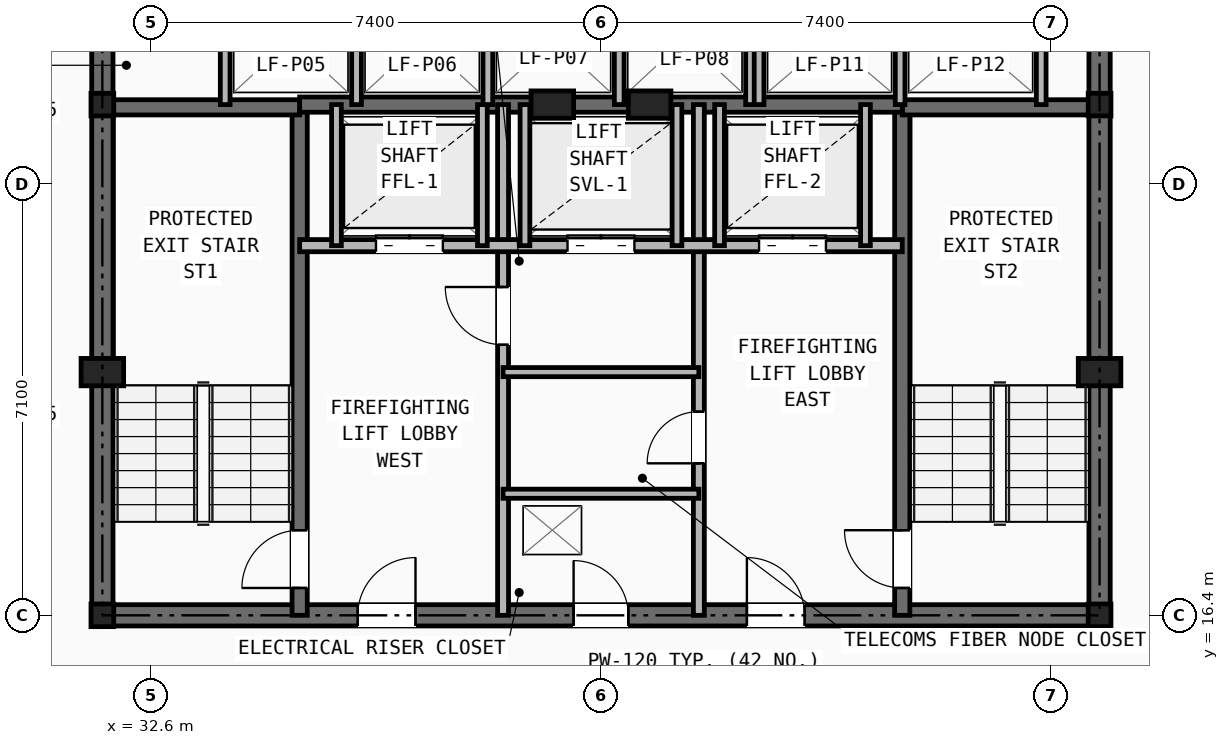
"""IFC4 building model, lengths in metres.
Left out: names, types, materials, properties, quantities, classifications, styles, units other than length and angle.
Written with IfcOpenShell. Run it as: python <this file> out.ifc"""

import sys

from ifc_helpers import new_model, si_unit, direction, frame, frame_2d, origin, origin_2d, place, context, subcontext, project, spatial, rectangle, i_section, extrude, element, fill, save


model = new_model("IFC4")
c1 = context("Model", 3, precision=1e-05, world=origin(), true_north=direction((0.0, 1.0)))
c2 = subcontext(c1, "Body", "Model", "MODEL_VIEW")
j1 = project(units=[si_unit("LENGTHUNIT", "METRE"), si_unit("PLANEANGLEUNIT", "RADIAN")], contexts=[c1])
p1 = place(None, origin())
s1 = spatial("IfcSite", under=j1, at=p1, CompositionType="ELEMENT")
p2 = place(p1, origin())
s2 = spatial("IfcBuilding", under=s1, at=p2, CompositionType="ELEMENT")
p3 = place(p2, frame((0.0, 0.0, 46.4)))
s3 = spatial("IfcBuildingStorey", under=s2, at=p3, CompositionType="ELEMENT", Elevation=46.4)
for number, where, z_axis, x_axis in (
    (1, (31.8, 16.4, 0.0), (0.0, 0.0, 1.0), (1.0, 0.0, 0.0)),
    (2, (48.2, 16.4, 0.0), (0.0, 0.0, 1.0), (1.0, 0.0, 0.0)),
    (3, (31.8, 24.8, 0.0), (0.0, 0.0, 1.0), (1.0, 0.0, 0.0)),
    (4, (48.2, 24.8, 0.0), (0.0, 0.0, 1.0), (1.0, 0.0, 0.0)),
):
    element("IfcColumn", number, at=place(p3, frame(where, z_axis=z_axis, x_axis=x_axis)), inside=s3, PredefinedType="COLUMN", context=c2, shape_type="SweptSolid", body=[
        extrude(i_section(OverallWidth=0.374, OverallDepth=0.372, WebThickness=0.016, FlangeThickness=0.026, at=origin_2d()), origin(), (0.0, 0.0, 1.0), 3.2),
    ])
for number, where, z_axis, x_axis in (
    (5, (31.8, 20.4, 0.0), (0.0, 0.0, 1.0), (1.0, 0.0, 0.0)),
    (6, (48.2, 20.4, 0.0), (0.0, 0.0, 1.0), (1.0, 0.0, 0.0)),
    (7, (39.2, 24.8, 0.0), (0.0, 0.0, 1.0), (1.0, 0.0, 0.0)),
    (8, (40.8, 24.8, 0.0), (0.0, 0.0, 1.0), (1.0, 0.0, 0.0)),
):
    element("IfcColumn", number, at=place(p3, frame(where, z_axis=z_axis, x_axis=x_axis)), inside=s3, PredefinedType="PILASTER", context=c2, shape_type="SweptSolid", body=[
        extrude(rectangle(XDim=0.7, YDim=0.45, at=origin_2d()), origin(), (0.0, 0.0, 1.0), 3.2),
    ])
p4 = place(p3, frame((31.8, 16.4, 0.0), z_axis=(0.0, 0.0, 1.0), x_axis=(1.0, 0.0, 0.0)))
e9 = element("IfcWall", 9, at=p4, inside=s3, PredefinedType="SHEAR", context=c2, shape_type="SweptSolid", body=[
    extrude(rectangle(XDim=16.4, YDim=0.35, at=frame_2d((8.2, 0.0))), origin(), (0.0, 0.0, 1.0), 2.98),
])
p5 = place(p4, frame((7.75, 0.0, 0.0)))
e10 = element("IfcOpeningElement", 10, at=p5, cuts=e9, PredefinedType="OPENING", context=c2, shape_type="SweptSolid", body=[
    extrude(rectangle(XDim=0.9, YDim=2.1, at=frame_2d((0.45, 1.05))), frame((0.0, 0.185, 0.0), z_axis=(0.0, -1.0, 0.0), x_axis=(1.0, 0.0, 0.0)), (0.0, 0.0, 1.0), 0.37),
])
p6 = place(p4, frame((4.2, 0.0, 0.0)))
e11 = element("IfcOpeningElement", 11, at=p6, cuts=e9, PredefinedType="OPENING", context=c2, shape_type="SweptSolid", body=[
    extrude(rectangle(XDim=0.95, YDim=2.1, at=frame_2d((0.475, 1.05))), frame((0.0, 0.185, 0.0), z_axis=(0.0, -1.0, 0.0), x_axis=(1.0, 0.0, 0.0)), (0.0, 0.0, 1.0), 0.37),
])
p7 = place(p4, frame((10.6, 0.0, 0.0)))
e12 = element("IfcOpeningElement", 12, at=p7, cuts=e9, PredefinedType="OPENING", context=c2, shape_type="SweptSolid", body=[
    extrude(rectangle(XDim=0.95, YDim=2.1, at=frame_2d((0.475, 1.05))), frame((0.0, 0.185, 0.0), z_axis=(0.0, -1.0, 0.0), x_axis=(1.0, 0.0, 0.0)), (0.0, 0.0, 1.0), 0.37),
])
p8 = place(p3, frame((31.8, 16.4, 0.0), z_axis=(0.0, 0.0, 1.0), x_axis=(0.0, 1.0, 0.0)))
e13 = element("IfcWall", 13, at=p8, inside=s3, PredefinedType="SHEAR", context=c2, shape_type="SweptSolid", body=[
    extrude(rectangle(XDim=14.8, YDim=0.35, at=frame_2d((7.4, 0.0))), origin(), (0.0, 0.0, 1.0), 2.98),
])
p9 = place(p8, frame((11.0, 0.0, 0.0)))
e14 = element("IfcOpeningElement", 14, at=p9, cuts=e13, PredefinedType="OPENING", context=c2, shape_type="SweptSolid", body=[
    extrude(rectangle(XDim=1.1, YDim=2.15, at=frame_2d((0.55, 1.075))), frame((0.0, 0.185, 0.0), z_axis=(0.0, -1.0, 0.0), x_axis=(1.0, 0.0, 0.0)), (0.0, 0.0, 1.0), 0.37),
])
p10 = place(p3, frame((48.2, 16.4, 0.0), z_axis=(0.0, 0.0, 1.0), x_axis=(0.0, 1.0, 0.0)))
e15 = element("IfcWall", 15, at=p10, inside=s3, PredefinedType="SHEAR", context=c2, shape_type="SweptSolid", body=[
    extrude(rectangle(XDim=14.8, YDim=0.35, at=frame_2d((7.4, 0.0))), origin(), (0.0, 0.0, 1.0), 2.98),
])
p11 = place(p10, frame((11.0, 0.0, 0.0)))
e16 = element("IfcOpeningElement", 16, at=p11, cuts=e15, PredefinedType="OPENING", context=c2, shape_type="SweptSolid", body=[
    extrude(rectangle(XDim=1.1, YDim=2.15, at=frame_2d((0.55, 1.075))), frame((0.0, 0.185, 0.0), z_axis=(0.0, -1.0, 0.0), x_axis=(1.0, 0.0, 0.0)), (0.0, 0.0, 1.0), 0.37),
])
p12 = place(p3, frame((35.045, 16.4, 0.0), z_axis=(0.0, 0.0, 1.0), x_axis=(0.0, 1.0, 0.0)))
e17 = element("IfcWall", 17, at=p12, inside=s3, PredefinedType="SHEAR", context=c2, shape_type="SweptSolid", body=[
    extrude(rectangle(XDim=8.4, YDim=0.25, at=frame_2d((4.2, 0.0))), origin(), (0.0, 0.0, 1.0), 2.98),
])
p13 = place(p12, frame((0.45, 0.0, 0.0)))
e18 = element("IfcOpeningElement", 18, at=p13, cuts=e17, PredefinedType="OPENING", context=c2, shape_type="SweptSolid", body=[
    extrude(rectangle(XDim=0.95, YDim=2.1, at=frame_2d((0.475, 1.05))), frame((0.0, 0.135, 0.0), z_axis=(0.0, -1.0, 0.0), x_axis=(1.0, 0.0, 0.0)), (0.0, 0.0, 1.0), 0.27),
])
p14 = place(p3, frame((31.8, 24.755, 0.0), z_axis=(0.0, 0.0, 1.0), x_axis=(1.0, 0.0, 0.0)))
e19 = element("IfcWall", 19, at=p14, inside=s3, PredefinedType="SHEAR", context=c2, shape_type="SweptSolid", body=[
    extrude(rectangle(XDim=3.245, YDim=0.25, at=frame_2d((1.623, 0.0))), origin(), (0.0, 0.0, 1.0), 2.98),
])
p15 = place(p3, frame((44.955, 16.4, 0.0), z_axis=(0.0, 0.0, 1.0), x_axis=(0.0, 1.0, 0.0)))
e20 = element("IfcWall", 20, at=p15, inside=s3, PredefinedType="SHEAR", context=c2, shape_type="SweptSolid", body=[
    extrude(rectangle(XDim=8.4, YDim=0.25, at=frame_2d((4.2, 0.0))), origin(), (0.0, 0.0, 1.0), 2.98),
])
p16 = place(p15, frame((0.45, 0.0, 0.0)))
e21 = element("IfcOpeningElement", 21, at=p16, cuts=e20, PredefinedType="OPENING", context=c2, shape_type="SweptSolid", body=[
    extrude(rectangle(XDim=0.95, YDim=2.1, at=frame_2d((0.475, 1.05))), frame((0.0, 0.135, 0.0), z_axis=(0.0, -1.0, 0.0), x_axis=(1.0, 0.0, 0.0)), (0.0, 0.0, 1.0), 0.27),
])
p17 = place(p3, frame((44.955, 24.755, 0.0), z_axis=(0.0, 0.0, 1.0), x_axis=(1.0, 0.0, 0.0)))
e22 = element("IfcWall", 22, at=p17, inside=s3, PredefinedType="SHEAR", context=c2, shape_type="SweptSolid", body=[
    extrude(rectangle(XDim=3.245, YDim=0.25, at=frame_2d((1.623, 0.0))), origin(), (0.0, 0.0, 1.0), 2.98),
])
p18 = place(p3, frame((35.045, 24.8, 0.0), z_axis=(0.0, 0.0, 1.0), x_axis=(1.0, 0.0, 0.0)))
e23 = element("IfcWall", 23, at=p18, inside=s3, PredefinedType="SHEAR", context=c2, shape_type="SweptSolid", body=[
    extrude(rectangle(XDim=9.91, YDim=0.25, at=frame_2d((4.955, 0.0))), origin(), (0.0, 0.0, 1.0), 2.98),
])
p19 = place(p3, frame((38.39, 16.4, 0.0), z_axis=(0.0, 0.0, 1.0), x_axis=(0.0, 1.0, 0.0)))
e24 = element("IfcWall", 24, at=p19, inside=s3, PredefinedType="PARTITIONING", context=c2, shape_type="SweptSolid", body=[
    extrude(rectangle(XDim=8.4, YDim=0.18, at=frame_2d((4.2, 0.0))), origin(), (0.0, 0.0, 1.0), 2.431),
])
p20 = place(p19, frame((4.45, 0.0, 0.0)))
e25 = element("IfcOpeningElement", 25, at=p20, cuts=e24, PredefinedType="OPENING", context=c2, shape_type="SweptSolid", body=[
    extrude(rectangle(XDim=0.95, YDim=2.1, at=frame_2d((0.475, 1.05))), frame((0.0, 0.1, 0.0), z_axis=(0.0, -1.0, 0.0), x_axis=(1.0, 0.0, 0.0)), (0.0, 0.0, 1.0), 0.2),
])
p21 = place(p3, frame((41.61, 16.4, 0.0), z_axis=(0.0, 0.0, 1.0), x_axis=(0.0, 1.0, 0.0)))
e26 = element("IfcWall", 26, at=p21, inside=s3, PredefinedType="PARTITIONING", context=c2, shape_type="SweptSolid", body=[
    extrude(rectangle(XDim=8.4, YDim=0.18, at=frame_2d((4.2, 0.0))), origin(), (0.0, 0.0, 1.0), 2.431),
])
p22 = place(p21, frame((2.5, 0.0, 0.0)))
e27 = element("IfcOpeningElement", 27, at=p22, cuts=e26, PredefinedType="OPENING", context=c2, shape_type="SweptSolid", body=[
    extrude(rectangle(XDim=0.85, YDim=2.05, at=frame_2d((0.425, 1.025))), frame((0.0, 0.1, 0.0), z_axis=(0.0, -1.0, 0.0), x_axis=(1.0, 0.0, 0.0)), (0.0, 0.0, 1.0), 0.2),
])
p23 = place(p3, frame((35.045, 22.48, 0.0), z_axis=(0.0, 0.0, 1.0), x_axis=(1.0, 0.0, 0.0)))
e28 = element("IfcWall", 28, at=p23, inside=s3, PredefinedType="SOLIDWALL", context=c2, shape_type="SweptSolid", body=[
    extrude(rectangle(XDim=9.91, YDim=0.2, at=frame_2d((4.955, 0.0))), origin(), (0.0, 0.0, 1.0), 2.98),
])
p24 = place(p23, frame((1.255, 0.0, 0.0)))
e29 = element("IfcOpeningElement", 29, at=p24, cuts=e28, PredefinedType="OPENING", context=c2, shape_type="SweptSolid", body=[
    extrude(rectangle(XDim=1.1, YDim=2.15, at=frame_2d((0.55, 1.075))), frame((0.0, 0.11, 0.0), z_axis=(0.0, -1.0, 0.0), x_axis=(1.0, 0.0, 0.0)), (0.0, 0.0, 1.0), 0.22),
])
p25 = place(p23, frame((7.555, 0.0, 0.0)))
e30 = element("IfcOpeningElement", 30, at=p25, cuts=e28, PredefinedType="OPENING", context=c2, shape_type="SweptSolid", body=[
    extrude(rectangle(XDim=1.1, YDim=2.15, at=frame_2d((0.55, 1.075))), frame((0.0, 0.11, 0.0), z_axis=(0.0, -1.0, 0.0), x_axis=(1.0, 0.0, 0.0)), (0.0, 0.0, 1.0), 0.22),
])
p26 = place(p23, frame((4.405, 0.0, 0.0)))
e31 = element("IfcOpeningElement", 31, at=p26, cuts=e28, PredefinedType="OPENING", context=c2, shape_type="SweptSolid", body=[
    extrude(rectangle(XDim=1.1, YDim=2.15, at=frame_2d((0.55, 1.075))), frame((0.0, 0.11, 0.0), z_axis=(0.0, -1.0, 0.0), x_axis=(1.0, 0.0, 0.0)), (0.0, 0.0, 1.0), 0.22),
])
for number, where, z_axis, x_axis in (
    (32, (38.39, 18.4, 0.0), (0.0, 0.0, 1.0), (1.0, 0.0, 0.0)),
    (33, (38.39, 20.4, 0.0), (0.0, 0.0, 1.0), (1.0, 0.0, 0.0)),
):
    element("IfcWall", number, at=place(p3, frame(where, z_axis=z_axis, x_axis=x_axis)), inside=s3, PredefinedType="PARTITIONING", context=c2, shape_type="SweptSolid", body=[
        extrude(rectangle(XDim=3.22, YDim=0.15, at=frame_2d((1.61, 0.0))), origin(), (0.0, 0.0, 1.0), 2.98),
    ])
for number, where, z_axis, x_axis in (
    (34, (35.65, 22.48, 0.0), (0.0, 0.0, 1.0), (0.0, 1.0, 0.0)),
    (35, (38.05, 22.48, 0.0), (0.0, 0.0, 1.0), (0.0, 1.0, 0.0)),
    (36, (41.95, 22.48, 0.0), (0.0, 0.0, 1.0), (0.0, 1.0, 0.0)),
    (37, (44.35, 22.48, 0.0), (0.0, 0.0, 1.0), (0.0, 1.0, 0.0)),
    (38, (38.75, 22.48, 0.0), (0.0, 0.0, 1.0), (0.0, 1.0, 0.0)),
    (39, (41.25, 22.48, 0.0), (0.0, 0.0, 1.0), (0.0, 1.0, 0.0)),
):
    element("IfcWall", number, at=place(p3, frame(where, z_axis=z_axis, x_axis=x_axis)), inside=s3, PredefinedType="SOLIDWALL", context=c2, shape_type="SweptSolid", body=[
        extrude(rectangle(XDim=2.32, YDim=0.16, at=frame_2d((1.16, 0.0))), origin(), (0.0, 0.0, 1.0), 2.98),
    ])
for number, where, z_axis, x_axis in (
    (40, (33.82, 24.8, 0.0), (0.0, 0.0, 1.0), (0.0, 1.0, 0.0)),
    (41, (35.98, 24.8, 0.0), (0.0, 0.0, 1.0), (0.0, 1.0, 0.0)),
    (42, (38.14, 24.8, 0.0), (0.0, 0.0, 1.0), (0.0, 1.0, 0.0)),
    (43, (40.3, 24.8, 0.0), (0.0, 0.0, 1.0), (0.0, 1.0, 0.0)),
    (44, (42.46, 24.8, 0.0), (0.0, 0.0, 1.0), (0.0, 1.0, 0.0)),
    (45, (42.6, 24.8, 0.0), (0.0, 0.0, 1.0), (0.0, 1.0, 0.0)),
    (46, (44.92, 24.8, 0.0), (0.0, 0.0, 1.0), (0.0, 1.0, 0.0)),
    (47, (47.24, 24.8, 0.0), (0.0, 0.0, 1.0), (0.0, 1.0, 0.0)),
):
    element("IfcWall", number, at=place(p3, frame(where, z_axis=z_axis, x_axis=x_axis)), inside=s3, PredefinedType="SOLIDWALL", context=c2, shape_type="SweptSolid", body=[
        extrude(rectangle(XDim=2.08, YDim=0.16, at=frame_2d((1.04, 0.0))), origin(), (0.0, 0.0, 1.0), 2.98),
    ])
p27 = place(p5, origin())
e48 = element("IfcDoor", 48, at=p27, inside=s3, OperationType="SINGLE_SWING_LEFT", PredefinedType="DOOR", context=c2, shape_type="SweptSolid", body=[
    extrude(rectangle(XDim=0.9, YDim=2.1, at=frame_2d((0.45, 1.05))), frame((0.0, 0.025, 0.0), z_axis=(0.0, -1.0, 0.0), x_axis=(1.0, 0.0, 0.0)), (0.0, 0.0, 1.0), 0.05),
])
fill(e10, e48)
p28 = place(p22, origin())
e49 = element("IfcDoor", 49, at=p28, inside=s3, OperationType="SINGLE_SWING_LEFT", PredefinedType="DOOR", context=c2, shape_type="SweptSolid", body=[
    extrude(rectangle(XDim=0.85, YDim=2.05, at=frame_2d((0.425, 1.025))), frame((0.0, 0.025, 0.0), z_axis=(0.0, -1.0, 0.0), x_axis=(1.0, 0.0, 0.0)), (0.0, 0.0, 1.0), 0.05),
])
fill(e27, e49)
p29 = place(p20, origin())
e50 = element("IfcDoor", 50, at=p29, inside=s3, OperationType="SINGLE_SWING_RIGHT", PredefinedType="DOOR", context=c2, shape_type="SweptSolid", body=[
    extrude(rectangle(XDim=0.95, YDim=2.1, at=frame_2d((0.475, 1.05))), frame((0.0, 0.025, 0.0), z_axis=(0.0, -1.0, 0.0), x_axis=(1.0, 0.0, 0.0)), (0.0, 0.0, 1.0), 0.05),
])
fill(e25, e50)
p30 = place(p13, origin())
e51 = element("IfcDoor", 51, at=p30, inside=s3, OperationType="SINGLE_SWING_LEFT", PredefinedType="DOOR", context=c2, shape_type="SweptSolid", body=[
    extrude(rectangle(XDim=0.95, YDim=2.1, at=frame_2d((0.475, 1.05))), frame((0.0, 0.025, 0.0), z_axis=(0.0, -1.0, 0.0), x_axis=(1.0, 0.0, 0.0)), (0.0, 0.0, 1.0), 0.05),
])
fill(e18, e51)
p31 = place(p16, origin())
e52 = element("IfcDoor", 52, at=p31, inside=s3, OperationType="SINGLE_SWING_RIGHT", PredefinedType="DOOR", context=c2, shape_type="SweptSolid", body=[
    extrude(rectangle(XDim=0.95, YDim=2.1, at=frame_2d((0.475, 1.05))), frame((0.0, 0.025, 0.0), z_axis=(0.0, -1.0, 0.0), x_axis=(1.0, 0.0, 0.0)), (0.0, 0.0, 1.0), 0.05),
])
fill(e21, e52)
p32 = place(p6, origin())
e53 = element("IfcDoor", 53, at=p32, inside=s3, OperationType="SINGLE_SWING_RIGHT", PredefinedType="DOOR", context=c2, shape_type="SweptSolid", body=[
    extrude(rectangle(XDim=0.95, YDim=2.1, at=frame_2d((0.475, 1.05))), frame((0.0, 0.025, 0.0), z_axis=(0.0, -1.0, 0.0), x_axis=(1.0, 0.0, 0.0)), (0.0, 0.0, 1.0), 0.05),
])
fill(e11, e53)
p33 = place(p7, origin())
e54 = element("IfcDoor", 54, at=p33, inside=s3, OperationType="SINGLE_SWING_LEFT", PredefinedType="DOOR", context=c2, shape_type="SweptSolid", body=[
    extrude(rectangle(XDim=0.95, YDim=2.1, at=frame_2d((0.475, 1.05))), frame((0.0, 0.025, 0.0), z_axis=(0.0, -1.0, 0.0), x_axis=(1.0, 0.0, 0.0)), (0.0, 0.0, 1.0), 0.05),
])
fill(e12, e54)
p34 = place(p24, origin())
e55 = element("IfcDoor", 55, at=p34, inside=s3, OperationType="DOUBLE_DOOR_SLIDING", PredefinedType="DOOR", context=c2, shape_type="SweptSolid", body=[
    extrude(rectangle(XDim=1.1, YDim=2.15, at=frame_2d((0.55, 1.075))), frame((0.0, 0.025, 0.0), z_axis=(0.0, -1.0, 0.0), x_axis=(1.0, 0.0, 0.0)), (0.0, 0.0, 1.0), 0.05),
])
fill(e29, e55)
p35 = place(p25, origin())
e56 = element("IfcDoor", 56, at=p35, inside=s3, OperationType="DOUBLE_DOOR_SLIDING", PredefinedType="DOOR", context=c2, shape_type="SweptSolid", body=[
    extrude(rectangle(XDim=1.1, YDim=2.15, at=frame_2d((0.55, 1.075))), frame((0.0, 0.025, 0.0), z_axis=(0.0, -1.0, 0.0), x_axis=(1.0, 0.0, 0.0)), (0.0, 0.0, 1.0), 0.05),
])
fill(e30, e56)
p36 = place(p26, origin())
e57 = element("IfcDoor", 57, at=p36, inside=s3, OperationType="DOUBLE_DOOR_SLIDING", PredefinedType="DOOR", context=c2, shape_type="SweptSolid", body=[
    extrude(rectangle(XDim=1.1, YDim=2.15, at=frame_2d((0.55, 1.075))), frame((0.0, 0.025, 0.0), z_axis=(0.0, -1.0, 0.0), x_axis=(1.0, 0.0, 0.0)), (0.0, 0.0, 1.0), 0.05),
])
fill(e31, e57)
save(model, sys.argv[1])
